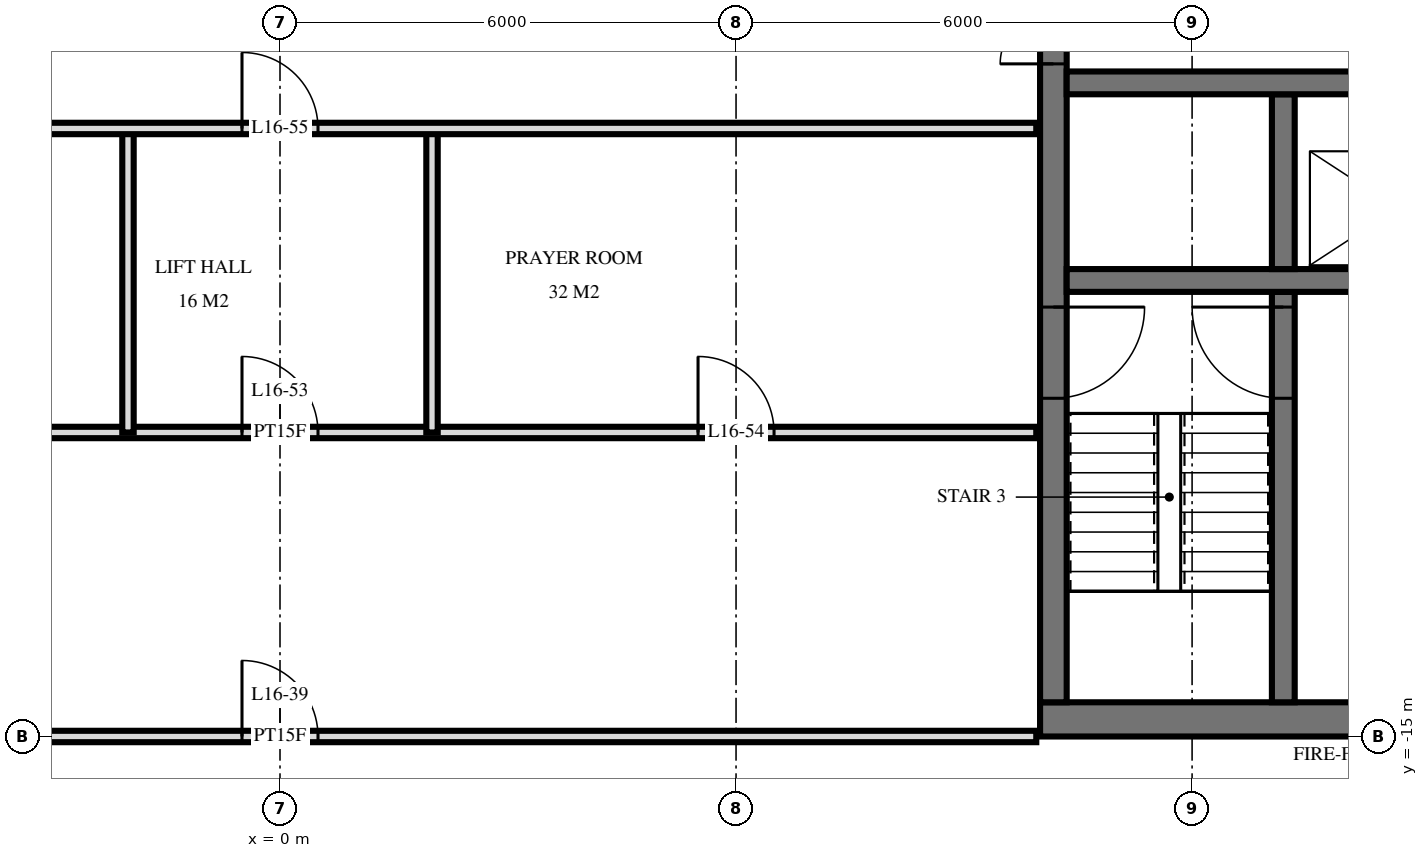
"""IFC4 building model, lengths in metres.
Left out: names, types, materials, properties, quantities, classifications, styles, units other than length and angle.
Written with IfcOpenShell. Run it as: python <this file> out.ifc"""

import sys

from ifc_helpers import new_model, si_unit, direction, frame, frame_2d, origin, place, context, subcontext, project, spatial, rectangle, extrude, element, fill, save


model = new_model("IFC4")
c1 = context("Model", 3, precision=1e-05, world=origin(), true_north=direction((0.0, 1.0)))
c2 = subcontext(c1, "Body", "Model", "MODEL_VIEW")
j1 = project(units=[si_unit("LENGTHUNIT", "METRE"), si_unit("PLANEANGLEUNIT", "RADIAN")], contexts=[c1])
p1 = place(None, origin())
s1 = spatial("IfcSite", under=j1, at=p1, CompositionType="ELEMENT")
p2 = place(p1, origin())
s2 = spatial("IfcBuilding", under=s1, at=p2, CompositionType="ELEMENT")
p3 = place(p2, frame((0.0, 0.0, 67.2)))
s3 = spatial("IfcBuildingStorey", under=s2, at=p3, CompositionType="ELEMENT", Elevation=67.2)
p4 = place(p3, frame((10.0, -14.775, 0.0), z_axis=(0.0, 0.0, 1.0), x_axis=(1.0, 0.0, 0.0)))
e1 = element("IfcWall", 1, at=p4, inside=s3, PredefinedType="SHEAR", context=c2, shape_type="SweptSolid", body=[
    extrude(rectangle(XDim=19.5, YDim=0.45, at=frame_2d((9.75, 0.0))), origin(), (0.0, 0.0, 1.0), 3.6),
])
p5 = place(p4, frame((7.1, 0.0, 0.0)))
e2 = element("IfcOpeningElement", 2, at=p5, cuts=e1, PredefinedType="OPENING", context=c2, shape_type="SweptSolid", body=[
    extrude(rectangle(XDim=1.2, YDim=2.1, at=frame_2d((0.6, 1.05))), frame((0.0, 0.235, 0.0), z_axis=(0.0, -1.0, 0.0), x_axis=(1.0, 0.0, 0.0)), (0.0, 0.0, 1.0), 0.47),
])
p6 = place(p4, frame((4.15, 0.0, 0.0)))
e3 = element("IfcOpeningElement", 3, at=p6, cuts=e1, PredefinedType="OPENING", context=c2, shape_type="SweptSolid", body=[
    extrude(rectangle(XDim=1.1, YDim=2.1, at=frame_2d((0.55, 1.05))), frame((0.0, 0.235, 0.0), z_axis=(0.0, -1.0, 0.0), x_axis=(1.0, 0.0, 0.0)), (0.0, 0.0, 1.0), 0.47),
])
p7 = place(p4, frame((10.1, 0.0, 0.0)))
e4 = element("IfcOpeningElement", 4, at=p7, cuts=e1, PredefinedType="OPENING", context=c2, shape_type="SweptSolid", body=[
    extrude(rectangle(XDim=0.9, YDim=2.1, at=frame_2d((0.45, 1.05))), frame((0.0, 0.235, 0.0), z_axis=(0.0, -1.0, 0.0), x_axis=(1.0, 0.0, 0.0)), (0.0, 0.0, 1.0), 0.47),
])
p8 = place(p4, frame((12.45, 0.0, 0.0)))
e5 = element("IfcOpeningElement", 5, at=p8, cuts=e1, PredefinedType="OPENING", context=c2, shape_type="SweptSolid", body=[
    extrude(rectangle(XDim=1.0, YDim=2.1, at=frame_2d((0.5, 1.05))), frame((0.0, 0.235, 0.0), z_axis=(0.0, -1.0, 0.0), x_axis=(1.0, 0.0, 0.0)), (0.0, 0.0, 1.0), 0.47),
])
p9 = place(p4, frame((16.25, 0.0, 0.0)))
e6 = element("IfcOpeningElement", 6, at=p9, cuts=e1, PredefinedType="OPENING", context=c2, shape_type="SweptSolid", body=[
    extrude(rectangle(XDim=1.0, YDim=2.1, at=frame_2d((0.5, 1.05))), frame((0.0, 0.235, 0.0), z_axis=(0.0, -1.0, 0.0), x_axis=(1.0, 0.0, 0.0)), (0.0, 0.0, 1.0), 0.47),
])
p10 = place(p3, frame((10.175, -14.55, 0.0), z_axis=(0.0, 0.0, 1.0), x_axis=(0.0, 1.0, 0.0)))
e7 = element("IfcWall", 7, at=p10, inside=s3, PredefinedType="SHEAR", context=c2, shape_type="SweptSolid", body=[
    extrude(rectangle(XDim=14.1, YDim=0.35, at=frame_2d((7.05, 0.0))), origin(), (0.0, 0.0, 1.0), 3.6),
])
p11 = place(p10, frame((8.4, 0.0, 0.0)))
e8 = element("IfcOpeningElement", 8, at=p11, cuts=e7, PredefinedType="OPENING", context=c2, shape_type="SweptSolid", body=[
    extrude(rectangle(XDim=1.4, YDim=2.4, at=frame_2d((0.7, 1.2))), frame((0.0, 0.185, 0.0), z_axis=(0.0, -1.0, 0.0), x_axis=(1.0, 0.0, 0.0)), (0.0, 0.0, 1.0), 0.37),
])
p12 = place(p10, frame((10.0, 0.0, 0.0)))
e9 = element("IfcOpeningElement", 9, at=p12, cuts=e7, PredefinedType="OPENING", context=c2, shape_type="SweptSolid", body=[
    extrude(rectangle(XDim=1.4, YDim=2.4, at=frame_2d((0.7, 1.2))), frame((0.0, 0.185, 0.0), z_axis=(0.0, -1.0, 0.0), x_axis=(1.0, 0.0, 0.0)), (0.0, 0.0, 1.0), 0.37),
])
p13 = place(p10, frame((4.0, 0.0, 0.0)))
e10 = element("IfcOpeningElement", 10, at=p13, cuts=e7, PredefinedType="OPENING", context=c2, shape_type="SweptSolid", body=[
    extrude(rectangle(XDim=1.2, YDim=2.1, at=frame_2d((0.6, 1.05))), frame((0.0, 0.185, 0.0), z_axis=(0.0, -1.0, 0.0), x_axis=(1.0, 0.0, 0.0)), (0.0, 0.0, 1.0), 0.37),
])
p14 = place(p3, frame((10.35, -6.4, 0.0), z_axis=(0.0, 0.0, 1.0), x_axis=(1.0, 0.0, 0.0)))
e11 = element("IfcWall", 11, at=p14, inside=s3, PredefinedType="SHEAR", context=c2, shape_type="SweptSolid", body=[
    extrude(rectangle(XDim=18.7, YDim=0.3, at=frame_2d((9.35, 0.0))), origin(), (0.0, 0.0, 1.0), 3.6),
])
p15 = place(p14, frame((14.65, 0.0, 0.0)))
e12 = element("IfcOpeningElement", 12, at=p15, cuts=e11, PredefinedType="OPENING", context=c2, shape_type="SweptSolid", body=[
    extrude(rectangle(XDim=1.1, YDim=2.1, at=frame_2d((0.55, 1.05))), frame((0.0, 0.16, 0.0), z_axis=(0.0, -1.0, 0.0), x_axis=(1.0, 0.0, 0.0)), (0.0, 0.0, 1.0), 0.32),
])
p16 = place(p14, frame((17.05, 0.0, 0.0)))
e13 = element("IfcOpeningElement", 13, at=p16, cuts=e11, PredefinedType="OPENING", context=c2, shape_type="SweptSolid", body=[
    extrude(rectangle(XDim=1.1, YDim=2.1, at=frame_2d((0.55, 1.05))), frame((0.0, 0.16, 0.0), z_axis=(0.0, -1.0, 0.0), x_axis=(1.0, 0.0, 0.0)), (0.0, 0.0, 1.0), 0.32),
])
p17 = place(p14, frame((6.8, 0.0, 0.0)))
e14 = element("IfcOpeningElement", 14, at=p17, cuts=e11, PredefinedType="OPENING", context=c2, shape_type="SweptSolid", body=[
    extrude(rectangle(XDim=1.1, YDim=2.1, at=frame_2d((0.55, 1.05))), frame((0.0, 0.16, 0.0), z_axis=(0.0, -1.0, 0.0), x_axis=(1.0, 0.0, 0.0)), (0.0, 0.0, 1.0), 0.32),
])
p18 = place(p14, frame((12.1, 0.0, 0.0)))
e15 = element("IfcOpeningElement", 15, at=p18, cuts=e11, PredefinedType="OPENING", context=c2, shape_type="SweptSolid", body=[
    extrude(rectangle(XDim=1.0, YDim=2.1, at=frame_2d((0.5, 1.05))), frame((0.0, 0.16, 0.0), z_axis=(0.0, -1.0, 0.0), x_axis=(1.0, 0.0, 0.0)), (0.0, 0.0, 1.0), 0.32),
])
p19 = place(p3, frame((10.35, -9.0, 0.0), z_axis=(0.0, 0.0, 1.0), x_axis=(1.0, 0.0, 0.0)))
e16 = element("IfcWall", 16, at=p19, inside=s3, PredefinedType="SHEAR", context=c2, shape_type="SweptSolid", body=[
    extrude(rectangle(XDim=18.7, YDim=0.3, at=frame_2d((9.35, 0.0))), origin(), (0.0, 0.0, 1.0), 3.6),
])
p20 = place(p19, frame((3.8, 0.0, 0.0)))
e17 = element("IfcOpeningElement", 17, at=p20, cuts=e16, PredefinedType="OPENING", context=c2, shape_type="SweptSolid", body=[
    extrude(rectangle(XDim=1.1, YDim=2.1, at=frame_2d((0.55, 1.05))), frame((0.0, 0.16, 0.0), z_axis=(0.0, -1.0, 0.0), x_axis=(1.0, 0.0, 0.0)), (0.0, 0.0, 1.0), 0.32),
])
p21 = place(p3, frame((13.2, -8.85, 0.0), z_axis=(0.0, 0.0, 1.0), x_axis=(0.0, 1.0, 0.0)))
e18 = element("IfcWall", 18, at=p21, inside=s3, PredefinedType="SHEAR", context=c2, shape_type="SweptSolid", body=[
    extrude(rectangle(XDim=2.3, YDim=0.3, at=frame_2d((1.15, 0.0))), origin(), (0.0, 0.0, 1.0), 3.6),
])
p22 = place(p3, frame((13.2, -14.55, 0.0), z_axis=(0.0, 0.0, 1.0), x_axis=(0.0, 1.0, 0.0)))
e19 = element("IfcWall", 19, at=p22, inside=s3, PredefinedType="SHEAR", context=c2, shape_type="SweptSolid", body=[
    extrude(rectangle(XDim=5.4, YDim=0.3, at=frame_2d((2.7, 0.0))), origin(), (0.0, 0.0, 1.0), 3.6),
])
p23 = place(p22, frame((4.0, 0.0, 0.0)))
e20 = element("IfcOpeningElement", 20, at=p23, cuts=e19, PredefinedType="OPENING", context=c2, shape_type="SweptSolid", body=[
    extrude(rectangle(XDim=1.2, YDim=2.1, at=frame_2d((0.6, 1.05))), frame((0.0, 0.16, 0.0), z_axis=(0.0, -1.0, 0.0), x_axis=(1.0, 0.0, 0.0)), (0.0, 0.0, 1.0), 0.32),
])
for number, where, z_axis, x_axis in (
    (21, (2.0, -11.0, 0.0), (0.0, 0.0, 1.0), (0.0, 1.0, 0.0)),
    (22, (-2.0, -11.0, 0.0), (0.0, 0.0, 1.0), (0.0, 1.0, 0.0)),
):
    element("IfcWall", number, at=place(p3, frame(where, z_axis=z_axis, x_axis=x_axis)), inside=s3, PredefinedType="PARTITIONING", context=c2, shape_type="SweptSolid", body=[
        extrude(rectangle(XDim=4.0, YDim=0.15, at=frame_2d((2.0, 0.0))), origin(), (0.0, 0.0, 1.0), 3.32),
    ])
p24 = place(p3, frame((-9.95, -15.0, 0.0), z_axis=(0.0, 0.0, 1.0), x_axis=(1.0, 0.0, 0.0)))
e23 = element("IfcWall", 23, at=p24, inside=s3, PredefinedType="PARTITIONING", context=c2, shape_type="SweptSolid", body=[
    extrude(rectangle(XDim=19.9, YDim=0.15, at=frame_2d((9.95, 0.0))), origin(), (0.0, 0.0, 1.0), 2.684),
])
p25 = place(p24, frame((9.45, 0.0, 0.0)))
e24 = element("IfcOpeningElement", 24, at=p25, cuts=e23, PredefinedType="OPENING", context=c2, shape_type="SweptSolid", body=[
    extrude(rectangle(XDim=1.0, YDim=2.1, at=frame_2d((0.5, 1.05))), frame((0.0, 0.085, 0.0), z_axis=(0.0, -1.0, 0.0), x_axis=(1.0, 0.0, 0.0)), (0.0, 0.0, 1.0), 0.17),
])
p26 = place(p3, frame((-9.95, -11.0, 0.0), z_axis=(0.0, 0.0, 1.0), x_axis=(1.0, 0.0, 0.0)))
e25 = element("IfcWall", 25, at=p26, inside=s3, PredefinedType="PARTITIONING", context=c2, shape_type="SweptSolid", body=[
    extrude(rectangle(XDim=19.9, YDim=0.15, at=frame_2d((9.95, 0.0))), origin(), (0.0, 0.0, 1.0), 3.32),
])
p27 = place(p26, frame((9.45, 0.0, 0.0)))
e26 = element("IfcOpeningElement", 26, at=p27, cuts=e25, PredefinedType="OPENING", context=c2, shape_type="SweptSolid", body=[
    extrude(rectangle(XDim=1.0, YDim=2.1, at=frame_2d((0.5, 1.05))), frame((0.0, 0.085, 0.0), z_axis=(0.0, -1.0, 0.0), x_axis=(1.0, 0.0, 0.0)), (0.0, 0.0, 1.0), 0.17),
])
p28 = place(p26, frame((15.45, 0.0, 0.0)))
e27 = element("IfcOpeningElement", 27, at=p28, cuts=e25, PredefinedType="OPENING", context=c2, shape_type="SweptSolid", body=[
    extrude(rectangle(XDim=1.0, YDim=2.1, at=frame_2d((0.5, 1.05))), frame((0.0, 0.085, 0.0), z_axis=(0.0, -1.0, 0.0), x_axis=(1.0, 0.0, 0.0)), (0.0, 0.0, 1.0), 0.17),
])
p29 = place(p3, frame((-9.95, -7.0, 0.0), z_axis=(0.0, 0.0, 1.0), x_axis=(1.0, 0.0, 0.0)))
e28 = element("IfcWall", 28, at=p29, inside=s3, PredefinedType="PARTITIONING", context=c2, shape_type="SweptSolid", body=[
    extrude(rectangle(XDim=19.9, YDim=0.15, at=frame_2d((9.95, 0.0))), origin(), (0.0, 0.0, 1.0), 3.32),
])
p30 = place(p29, frame((9.45, 0.0, 0.0)))
e29 = element("IfcOpeningElement", 29, at=p30, cuts=e28, PredefinedType="OPENING", context=c2, shape_type="SweptSolid", body=[
    extrude(rectangle(XDim=1.0, YDim=2.1, at=frame_2d((0.5, 1.05))), frame((0.0, 0.085, 0.0), z_axis=(0.0, -1.0, 0.0), x_axis=(1.0, 0.0, 0.0)), (0.0, 0.0, 1.0), 0.17),
])
p31 = place(p29, frame((3.45, 0.0, 0.0)))
e30 = element("IfcOpeningElement", 30, at=p31, cuts=e28, PredefinedType="OPENING", context=c2, shape_type="SweptSolid", body=[
    extrude(rectangle(XDim=1.0, YDim=2.1, at=frame_2d((0.5, 1.05))), frame((0.0, 0.085, 0.0), z_axis=(0.0, -1.0, 0.0), x_axis=(1.0, 0.0, 0.0)), (0.0, 0.0, 1.0), 0.17),
])
p32 = place(p11, origin())
e31 = element("IfcDoor", 31, at=p32, inside=s3, OperationType="DOUBLE_DOOR_SINGLE_SWING", PredefinedType="DOOR", context=c2, shape_type="SweptSolid", body=[
    extrude(rectangle(XDim=1.4, YDim=2.4, at=frame_2d((0.7, 1.2))), frame((0.0, 0.025, 0.0), z_axis=(0.0, -1.0, 0.0), x_axis=(1.0, 0.0, 0.0)), (0.0, 0.0, 1.0), 0.05),
])
fill(e8, e31)
p33 = place(p13, frame((0.6, 0.0, 0.0), z_axis=(0.0, 0.0, 1.0), x_axis=(-1.0, 0.0, 0.0)))
e32 = element("IfcDoor", 32, at=p33, inside=s3, OperationType="SINGLE_SWING_RIGHT", PredefinedType="DOOR", context=c2, shape_type="SweptSolid", body=[
    extrude(rectangle(XDim=1.2, YDim=2.1, at=frame_2d((0.0, 1.05))), frame((0.0, -0.025, 0.0), z_axis=(0.0, 1.0, 0.0), x_axis=(-1.0, 0.0, 0.0)), (0.0, 0.0, 1.0), 0.05),
])
fill(e10, e32)
p34 = place(p23, origin())
e33 = element("IfcDoor", 33, at=p34, inside=s3, OperationType="SINGLE_SWING_LEFT", PredefinedType="DOOR", context=c2, shape_type="SweptSolid", body=[
    extrude(rectangle(XDim=1.2, YDim=2.1, at=frame_2d((0.6, 1.05))), frame((0.0, 0.025, 0.0), z_axis=(0.0, -1.0, 0.0), x_axis=(1.0, 0.0, 0.0)), (0.0, 0.0, 1.0), 0.05),
])
fill(e20, e33)
p35 = place(p25, origin())
e34 = element("IfcDoor", 34, at=p35, inside=s3, OperationType="SINGLE_SWING_RIGHT", PredefinedType="DOOR", context=c2, shape_type="SweptSolid", body=[
    extrude(rectangle(XDim=1.0, YDim=2.1, at=frame_2d((0.5, 1.05))), frame((0.0, 0.025, 0.0), z_axis=(0.0, -1.0, 0.0), x_axis=(1.0, 0.0, 0.0)), (0.0, 0.0, 1.0), 0.05),
])
fill(e24, e34)
p36 = place(p27, origin())
e35 = element("IfcDoor", 35, at=p36, inside=s3, OperationType="SINGLE_SWING_RIGHT", PredefinedType="DOOR", context=c2, shape_type="SweptSolid", body=[
    extrude(rectangle(XDim=1.0, YDim=2.1, at=frame_2d((0.5, 1.05))), frame((0.0, 0.025, 0.0), z_axis=(0.0, -1.0, 0.0), x_axis=(1.0, 0.0, 0.0)), (0.0, 0.0, 1.0), 0.05),
])
fill(e26, e35)
p37 = place(p28, origin())
e36 = element("IfcDoor", 36, at=p37, inside=s3, OperationType="SINGLE_SWING_RIGHT", PredefinedType="DOOR", context=c2, shape_type="SweptSolid", body=[
    extrude(rectangle(XDim=1.0, YDim=2.1, at=frame_2d((0.5, 1.05))), frame((0.0, 0.025, 0.0), z_axis=(0.0, -1.0, 0.0), x_axis=(1.0, 0.0, 0.0)), (0.0, 0.0, 1.0), 0.05),
])
fill(e27, e36)
p38 = place(p30, origin())
e37 = element("IfcDoor", 37, at=p38, inside=s3, OperationType="SINGLE_SWING_RIGHT", PredefinedType="DOOR", context=c2, shape_type="SweptSolid", body=[
    extrude(rectangle(XDim=1.0, YDim=2.1, at=frame_2d((0.5, 1.05))), frame((0.0, 0.025, 0.0), z_axis=(0.0, -1.0, 0.0), x_axis=(1.0, 0.0, 0.0)), (0.0, 0.0, 1.0), 0.05),
])
fill(e29, e37)
save(model, sys.argv[1])
